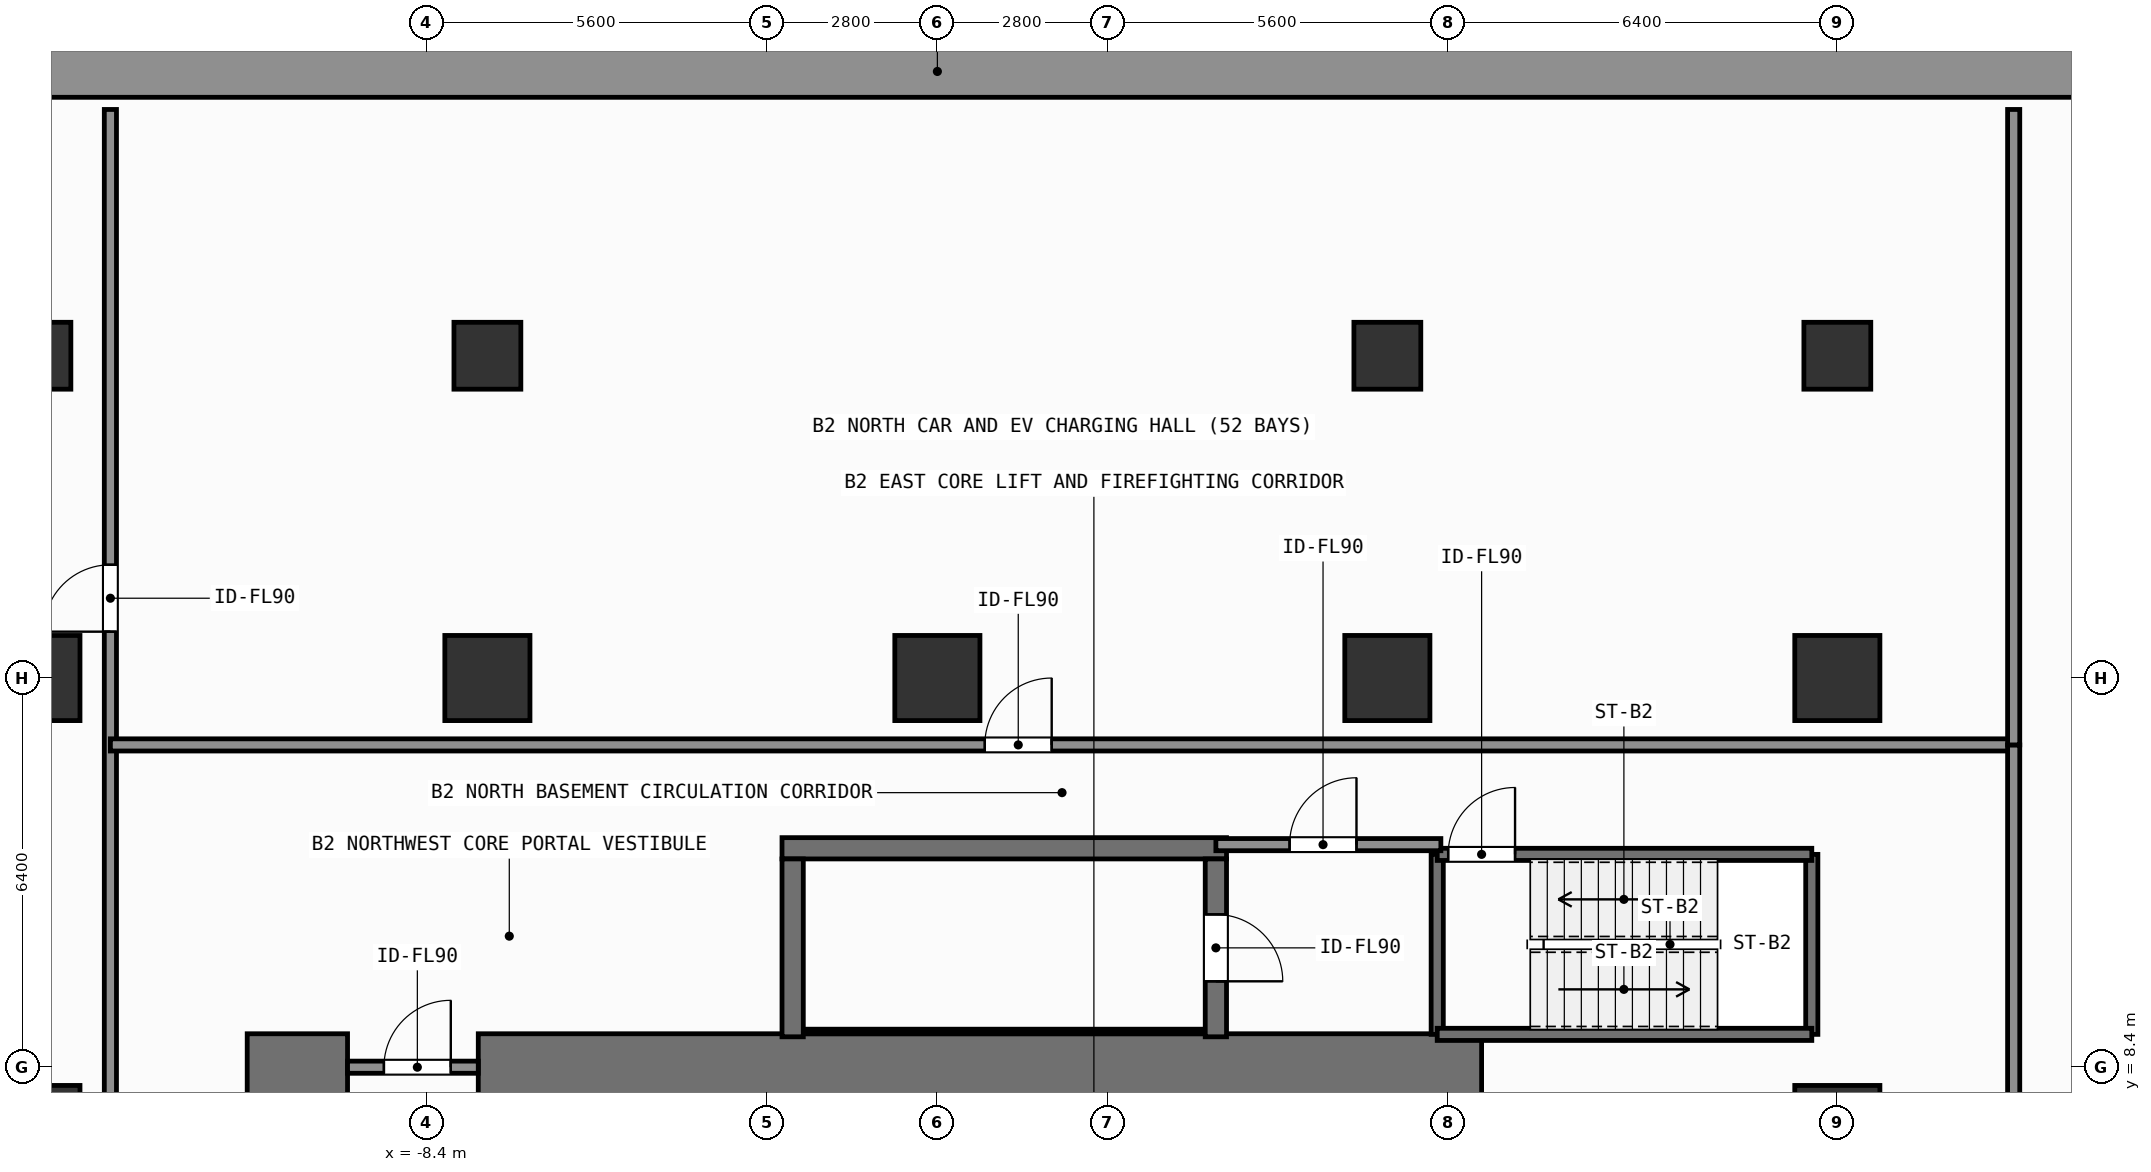
"""IFC4 building model, lengths in metres.
Left out: names, types, materials, properties, quantities, classifications, styles, units other than length and angle.
Written with IfcOpenShell. Run it as: python <this file> out.ifc"""

import sys

from ifc_helpers import new_model, si_unit, direction, frame, frame_2d, origin, origin_2d, place, context, subcontext, project, spatial, rectangle, extrude, element, fill, save


model = new_model("IFC4")
c1 = context("Model", 3, precision=1e-05, world=origin(), true_north=direction((0.0, 1.0)))
c2 = subcontext(c1, "Body", "Model", "MODEL_VIEW")
j1 = project(units=[si_unit("LENGTHUNIT", "METRE"), si_unit("PLANEANGLEUNIT", "RADIAN")], contexts=[c1])
p1 = place(None, origin())
s1 = spatial("IfcSite", under=j1, at=p1, CompositionType="ELEMENT")
p2 = place(p1, origin())
s2 = spatial("IfcBuilding", under=s1, at=p2, CompositionType="ELEMENT")
p3 = place(p2, frame((0.0, 0.0, -8.4)))
s3 = spatial("IfcBuildingStorey", under=s2, at=p3, CompositionType="ELEMENT", Elevation=-8.4)
p4 = place(p3, frame((-33.6, 24.775, 0.0), z_axis=(0.0, 0.0, 1.0), x_axis=(1.0, 0.0, 0.0)))
e1 = element("IfcWall", 1, at=p4, inside=s3, PredefinedType="SOLIDWALL", context=c2, shape_type="SweptSolid", body=[
    extrude(rectangle(XDim=67.2, YDim=0.85, at=frame_2d((33.6, 0.0))), origin(), (0.0, 0.0, 1.0), 4.2),
])
p5 = place(p3, frame((-11.35, 8.4, 0.0), z_axis=(0.0, 0.0, 1.0), x_axis=(1.0, 0.0, 0.0)))
e2 = element("IfcWall", 2, at=p5, inside=s3, PredefinedType="SHEAR", context=c2, shape_type="SweptSolid", body=[
    extrude(rectangle(XDim=1.65, YDim=1.1, at=frame_2d((0.825, 0.0))), origin(), (0.0, 0.0, 1.0), 4.2),
])
p6 = place(p3, frame((-7.55, 8.4, 0.0), z_axis=(0.0, 0.0, 1.0), x_axis=(1.0, 0.0, 0.0)))
e3 = element("IfcWall", 3, at=p6, inside=s3, PredefinedType="SHEAR", context=c2, shape_type="SweptSolid", body=[
    extrude(rectangle(XDim=16.5, YDim=1.1, at=frame_2d((8.25, 0.0))), origin(), (0.0, 0.0, 1.0), 4.2),
])
p7 = place(p3, frame((-2.555, 12.0, 0.0), z_axis=(0.0, 0.0, 1.0), x_axis=(1.0, 0.0, 0.0)))
e4 = element("IfcWall", 4, at=p7, inside=s3, PredefinedType="SHEAR", context=c2, shape_type="SweptSolid", body=[
    extrude(rectangle(XDim=7.31, YDim=0.35, at=frame_2d((3.655, 0.0))), origin(), (0.0, 0.0, 1.0), 4.2),
])
p8 = place(p3, frame((-2.2, 8.988, 0.0), z_axis=(0.0, 0.0, 1.0), x_axis=(1.0, 0.0, 0.0)))
e5 = element("IfcWall", 5, at=p8, inside=s3, PredefinedType="SHEAR", context=c2, shape_type="SweptSolid", body=[
    extrude(rectangle(XDim=6.6, YDim=0.075, at=frame_2d((3.3, 0.0))), origin(), (0.0, 0.0, 1.0), 4.2),
])
p9 = place(p3, frame((-2.38, 8.9, 0.0), z_axis=(0.0, 0.0, 1.0), x_axis=(0.0, 1.0, 0.0)))
e6 = element("IfcWall", 6, at=p9, inside=s3, PredefinedType="SHEAR", context=c2, shape_type="SweptSolid", body=[
    extrude(rectangle(XDim=2.925, YDim=0.35, at=frame_2d((1.462, 0.0))), origin(), (0.0, 0.0, 1.0), 4.2),
])
p10 = place(p3, frame((4.58, 11.825, 0.0), z_axis=(0.0, 0.0, 1.0), x_axis=(0.0, -1.0, 0.0)))
e7 = element("IfcWall", 7, at=p10, inside=s3, PredefinedType="SHEAR", context=c2, shape_type="SweptSolid", body=[
    extrude(rectangle(XDim=2.925, YDim=0.35, at=frame_2d((1.462, 0.0))), origin(), (0.0, 0.0, 1.0), 4.2),
])
p11 = place(p10, frame((0.913, 0.0, 0.0)))
e8 = element("IfcOpeningElement", 8, at=p11, cuts=e7, PredefinedType="OPENING", context=c2, shape_type="SweptSolid", body=[
    extrude(rectangle(XDim=1.1, YDim=2.15, at=frame_2d((0.55, 1.075))), frame((0.0, 0.185, 0.0), z_axis=(0.0, -1.0, 0.0), x_axis=(1.0, 0.0, 0.0)), (0.0, 0.0, 1.0), 0.37),
])
for number, where, z_axis, x_axis in (
    (9, (-14.8, 14.8, 0.0), (0.0, 0.0, 1.0), (1.0, 0.0, 0.0)),
    (10, (-7.4, 14.8, 0.0), (0.0, 0.0, 1.0), (1.0, 0.0, 0.0)),
    (11, (0.0, 14.8, 0.0), (0.0, 0.0, 1.0), (1.0, 0.0, 0.0)),
    (12, (7.4, 14.8, 0.0), (0.0, 0.0, 1.0), (1.0, 0.0, 0.0)),
    (13, (14.8, 14.8, 0.0), (0.0, 0.0, 1.0), (1.0, 0.0, 0.0)),
    (14, (-14.8, 7.4, 0.0), (0.0, 0.0, 1.0), (1.0, 0.0, 0.0)),
    (15, (14.8, 7.4, 0.0), (0.0, 0.0, 1.0), (1.0, 0.0, 0.0)),
):
    element("IfcColumn", number, at=place(p3, frame(where, z_axis=z_axis, x_axis=x_axis)), inside=s3, PredefinedType="COLUMN", context=c2, shape_type="SweptSolid", body=[
        extrude(rectangle(XDim=1.4, YDim=1.4, at=origin_2d()), origin(), (0.0, 0.0, 1.0), 4.2),
    ])
for number, where, z_axis, x_axis in (
    (16, (-14.8, 20.1, 0.0), (0.0, 0.0, 1.0), (1.0, 0.0, 0.0)),
    (17, (-7.4, 20.1, 0.0), (0.0, 0.0, 1.0), (1.0, 0.0, 0.0)),
    (18, (7.4, 20.1, 0.0), (0.0, 0.0, 1.0), (1.0, 0.0, 0.0)),
    (19, (14.8, 20.1, 0.0), (0.0, 0.0, 1.0), (1.0, 0.0, 0.0)),
):
    element("IfcColumn", number, at=place(p3, frame(where, z_axis=z_axis, x_axis=x_axis)), inside=s3, PredefinedType="COLUMN", context=c2, shape_type="SweptSolid", body=[
        extrude(rectangle(XDim=1.1, YDim=1.1, at=origin_2d()), origin(), (0.0, 0.0, 1.0), 4.2),
    ])
for number, where, z_axis, x_axis in (
    (20, (8.22, 8.94, 0.0), (0.0, 0.0, 1.0), (0.0, 1.0, 0.0)),
    (21, (14.38, 11.9, 0.0), (0.0, 0.0, 1.0), (0.0, -1.0, 0.0)),
):
    element("IfcWall", number, at=place(p3, frame(where, z_axis=z_axis, x_axis=x_axis)), inside=s3, PredefinedType="SHEAR", context=c2, shape_type="SweptSolid", body=[
        extrude(rectangle(XDim=2.96, YDim=0.2, at=frame_2d((1.48, 0.0))), origin(), (0.0, 0.0, 1.0), 3.94),
    ])
p12 = place(p3, frame((14.38, 8.94, 0.0), z_axis=(0.0, 0.0, 1.0), x_axis=(-1.0, 0.0, 0.0)))
e22 = element("IfcWall", 22, at=p12, inside=s3, PredefinedType="SHEAR", context=c2, shape_type="SweptSolid", body=[
    extrude(rectangle(XDim=6.16, YDim=0.2, at=frame_2d((3.08, 0.0))), origin(), (0.0, 0.0, 1.0), 3.94),
])
p13 = place(p3, frame((8.22, 11.9, 0.0), z_axis=(0.0, 0.0, 1.0), x_axis=(1.0, 0.0, 0.0)))
e23 = element("IfcWall", 23, at=p13, inside=s3, PredefinedType="SHEAR", context=c2, shape_type="SweptSolid", body=[
    extrude(rectangle(XDim=6.16, YDim=0.2, at=frame_2d((3.08, 0.0))), origin(), (0.0, 0.0, 1.0), 3.94),
])
p14 = place(p13, frame((0.18, 0.0, 0.0)))
e24 = element("IfcOpeningElement", 24, at=p14, cuts=e23, PredefinedType="OPENING", context=c2, shape_type="SweptSolid", body=[
    extrude(rectangle(XDim=1.1, YDim=2.15, at=frame_2d((0.55, 1.075))), frame((0.0, 0.11, 0.0), z_axis=(0.0, -1.0, 0.0), x_axis=(1.0, 0.0, 0.0)), (0.0, 0.0, 1.0), 0.22),
])
p15 = place(p3, frame((4.58, 12.06, 0.0), z_axis=(0.0, 0.0, 1.0), x_axis=(1.0, 0.0, 0.0)))
e25 = element("IfcWall", 25, at=p15, inside=s3, PredefinedType="SOLIDWALL", context=c2, shape_type="SweptSolid", body=[
    extrude(rectangle(XDim=3.7, YDim=0.2, at=frame_2d((1.85, 0.0))), origin(), (0.0, 0.0, 1.0), 3.94),
])
p16 = place(p15, frame((1.212, 0.0, 0.0)))
e26 = element("IfcOpeningElement", 26, at=p16, cuts=e25, PredefinedType="OPENING", context=c2, shape_type="SweptSolid", body=[
    extrude(rectangle(XDim=1.1, YDim=2.15, at=frame_2d((0.55, 1.075))), frame((0.0, 0.11, 0.0), z_axis=(0.0, -1.0, 0.0), x_axis=(1.0, 0.0, 0.0)), (0.0, 0.0, 1.0), 0.22),
])
p17 = place(p3, frame((-9.7, 8.4, 0.0), z_axis=(0.0, 0.0, 1.0), x_axis=(1.0, 0.0, 0.0)))
e27 = element("IfcWall", 27, at=p17, inside=s3, PredefinedType="SOLIDWALL", context=c2, shape_type="SweptSolid", body=[
    extrude(rectangle(XDim=2.15, YDim=0.2, at=frame_2d((1.075, 0.0))), origin(), (0.0, 0.0, 1.0), 2.98),
])
p18 = place(p17, frame((0.598, 0.0, 0.0)))
e28 = element("IfcOpeningElement", 28, at=p18, cuts=e27, PredefinedType="OPENING", context=c2, shape_type="SweptSolid", body=[
    extrude(rectangle(XDim=1.1, YDim=2.15, at=frame_2d((0.55, 1.075))), frame((0.0, 0.11, 0.0), z_axis=(0.0, -1.0, 0.0), x_axis=(1.0, 0.0, 0.0)), (0.0, 0.0, 1.0), 0.22),
])
p19 = place(p3, frame((-13.6, 4.5, 0.0), z_axis=(0.0, 0.0, 1.0), x_axis=(0.0, 1.0, 0.0)))
e29 = element("IfcWall", 29, at=p19, inside=s3, PredefinedType="SOLIDWALL", context=c2, shape_type="SweptSolid", body=[
    extrude(rectangle(XDim=19.65, YDim=0.2, at=frame_2d((9.825, 0.0))), origin(), (0.0, 0.0, 1.0), 3.94),
])
p20 = place(p19, frame((11.062, 0.0, 0.0)))
e30 = element("IfcOpeningElement", 30, at=p20, cuts=e29, PredefinedType="OPENING", context=c2, shape_type="SweptSolid", body=[
    extrude(rectangle(XDim=1.1, YDim=2.15, at=frame_2d((0.55, 1.075))), frame((0.0, 0.11, 0.0), z_axis=(0.0, -1.0, 0.0), x_axis=(1.0, 0.0, 0.0)), (0.0, 0.0, 1.0), 0.22),
])
p21 = place(p3, frame((-13.6, 13.7, 0.0), z_axis=(0.0, 0.0, 1.0), x_axis=(1.0, 0.0, 0.0)))
e31 = element("IfcWall", 31, at=p21, inside=s3, PredefinedType="SOLIDWALL", context=c2, shape_type="SweptSolid", body=[
    extrude(rectangle(XDim=31.3, YDim=0.2, at=frame_2d((15.65, 0.0))), origin(), (0.0, 0.0, 1.0), 3.94),
])
p22 = place(p21, frame((14.38, 0.0, 0.0)))
e32 = element("IfcOpeningElement", 32, at=p22, cuts=e31, PredefinedType="OPENING", context=c2, shape_type="SweptSolid", body=[
    extrude(rectangle(XDim=1.1, YDim=2.15, at=frame_2d((0.55, 1.075))), frame((0.0, 0.11, 0.0), z_axis=(0.0, -1.0, 0.0), x_axis=(1.0, 0.0, 0.0)), (0.0, 0.0, 1.0), 0.22),
])
p23 = place(p3, frame((17.7, -14.55, 0.0), z_axis=(0.0, 0.0, 1.0), x_axis=(0.0, 1.0, 0.0)))
e33 = element("IfcWall", 33, at=p23, inside=s3, PredefinedType="SOLIDWALL", context=c2, shape_type="SweptSolid", body=[
    extrude(rectangle(XDim=28.25, YDim=0.2, at=frame_2d((14.125, 0.0))), origin(), (0.0, 0.0, 1.0), 3.94),
])
p24 = place(p23, frame((15.006, 0.0, 0.0)))
e34 = element("IfcOpeningElement", 34, at=p24, cuts=e33, PredefinedType="OPENING", context=c2, shape_type="SweptSolid", body=[
    extrude(rectangle(XDim=1.1, YDim=2.15, at=frame_2d((0.55, 1.075))), frame((0.0, 0.11, 0.0), z_axis=(0.0, -1.0, 0.0), x_axis=(1.0, 0.0, 0.0)), (0.0, 0.0, 1.0), 0.22),
])
p25 = place(p3, frame((17.7, 13.7, 0.0), z_axis=(0.0, 0.0, 1.0), x_axis=(0.0, 1.0, 0.0)))
e35 = element("IfcWall", 35, at=p25, inside=s3, PredefinedType="SOLIDWALL", context=c2, shape_type="SweptSolid", body=[
    extrude(rectangle(XDim=10.45, YDim=0.2, at=frame_2d((5.225, 0.0))), origin(), (0.0, 0.0, 1.0), 3.94),
])
p26 = place(p11, origin())
e36 = element("IfcDoor", 36, at=p26, inside=s3, OperationType="SINGLE_SWING_RIGHT", PredefinedType="DOOR", context=c2, shape_type="SweptSolid", body=[
    extrude(rectangle(XDim=1.1, YDim=2.15, at=frame_2d((0.55, 1.075))), frame((0.0, 0.025, 0.0), z_axis=(0.0, -1.0, 0.0), x_axis=(1.0, 0.0, 0.0)), (0.0, 0.0, 1.0), 0.05),
])
fill(e8, e36)
p27 = place(p14, origin())
e37 = element("IfcDoor", 37, at=p27, inside=s3, OperationType="SINGLE_SWING_RIGHT", PredefinedType="DOOR", context=c2, shape_type="SweptSolid", body=[
    extrude(rectangle(XDim=1.1, YDim=2.15, at=frame_2d((0.55, 1.075))), frame((0.0, 0.025, 0.0), z_axis=(0.0, -1.0, 0.0), x_axis=(1.0, 0.0, 0.0)), (0.0, 0.0, 1.0), 0.05),
])
fill(e24, e37)
p28 = place(p16, origin())
e38 = element("IfcDoor", 38, at=p28, inside=s3, OperationType="SINGLE_SWING_RIGHT", PredefinedType="DOOR", context=c2, shape_type="SweptSolid", body=[
    extrude(rectangle(XDim=1.1, YDim=2.15, at=frame_2d((0.55, 1.075))), frame((0.0, 0.025, 0.0), z_axis=(0.0, -1.0, 0.0), x_axis=(1.0, 0.0, 0.0)), (0.0, 0.0, 1.0), 0.05),
])
fill(e26, e38)
p29 = place(p18, origin())
e39 = element("IfcDoor", 39, at=p29, inside=s3, OperationType="SINGLE_SWING_RIGHT", PredefinedType="DOOR", context=c2, shape_type="SweptSolid", body=[
    extrude(rectangle(XDim=1.1, YDim=2.15, at=frame_2d((0.55, 1.075))), frame((0.0, 0.025, 0.0), z_axis=(0.0, -1.0, 0.0), x_axis=(1.0, 0.0, 0.0)), (0.0, 0.0, 1.0), 0.05),
])
fill(e28, e39)
p30 = place(p20, origin())
e40 = element("IfcDoor", 40, at=p30, inside=s3, OperationType="SINGLE_SWING_LEFT", PredefinedType="DOOR", context=c2, shape_type="SweptSolid", body=[
    extrude(rectangle(XDim=1.1, YDim=2.15, at=frame_2d((0.55, 1.075))), frame((0.0, 0.025, 0.0), z_axis=(0.0, -1.0, 0.0), x_axis=(1.0, 0.0, 0.0)), (0.0, 0.0, 1.0), 0.05),
])
fill(e30, e40)
p31 = place(p22, origin())
e41 = element("IfcDoor", 41, at=p31, inside=s3, OperationType="SINGLE_SWING_RIGHT", PredefinedType="DOOR", context=c2, shape_type="SweptSolid", body=[
    extrude(rectangle(XDim=1.1, YDim=2.15, at=frame_2d((0.55, 1.075))), frame((0.0, 0.025, 0.0), z_axis=(0.0, -1.0, 0.0), x_axis=(1.0, 0.0, 0.0)), (0.0, 0.0, 1.0), 0.05),
])
fill(e32, e41)
save(model, sys.argv[1])
